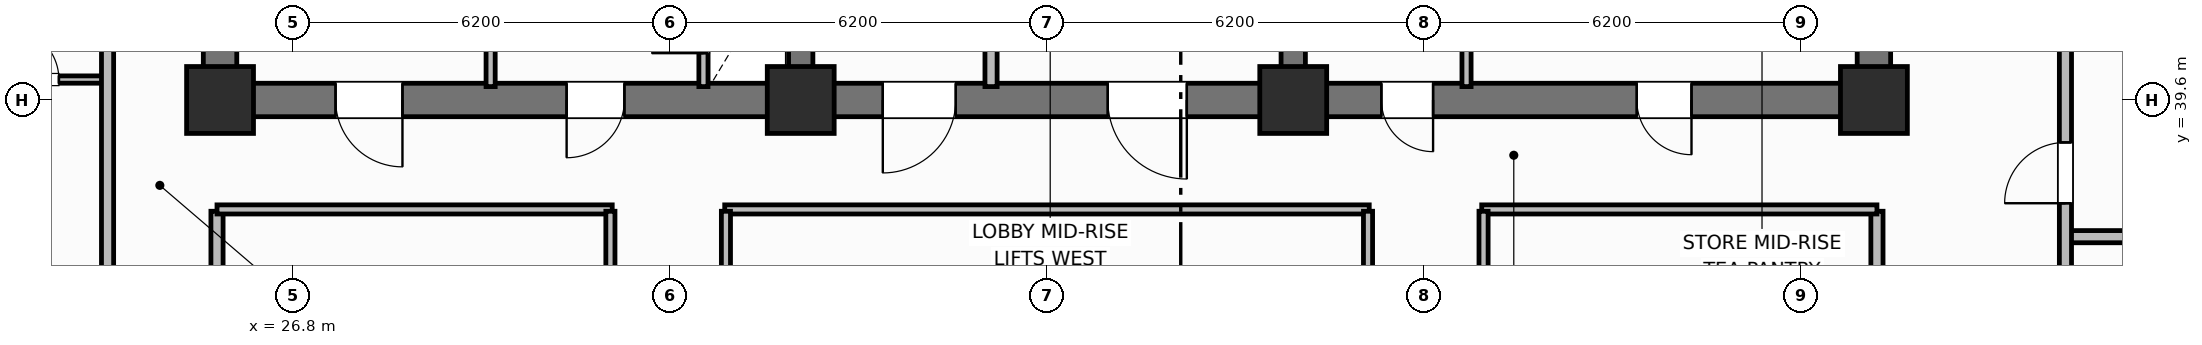
"""IFC4 building model, lengths in metres.
Left out: names, types, materials, properties, quantities, classifications, styles, units other than length and angle.
Written with IfcOpenShell. Run it as: python <this file> out.ifc"""

import sys

from ifc_helpers import new_model, si_unit, direction, frame, frame_2d, origin, origin_2d, place, context, subcontext, project, spatial, rectangle, extrude, element, fill, save


model = new_model("IFC4")
c1 = context("Model", 3, precision=1e-05, world=origin(), true_north=direction((0.0, 1.0)))
c2 = subcontext(c1, "Body", "Model", "MODEL_VIEW")
j1 = project(units=[si_unit("LENGTHUNIT", "METRE"), si_unit("PLANEANGLEUNIT", "RADIAN")], contexts=[c1])
p1 = place(None, origin())
s1 = spatial("IfcSite", under=j1, at=p1, CompositionType="ELEMENT")
p2 = place(p1, origin())
s2 = spatial("IfcBuilding", under=s1, at=p2, CompositionType="ELEMENT")
p3 = place(p2, frame((0.0, 0.0, 106.8)))
s3 = spatial("IfcBuildingStorey", under=s2, at=p3, CompositionType="ELEMENT", Elevation=106.8)
for number, where, z_axis, x_axis in (
    (1, (25.6, 39.875, 0.0), (0.0, 0.0, 1.0), (0.0, 1.0, 0.0)),
    (2, (52.8, 39.875, 0.0), (0.0, 0.0, 1.0), (0.0, 1.0, 0.0)),
):
    element("IfcWall", number, at=place(p3, frame(where, z_axis=z_axis, x_axis=x_axis)), inside=s3, PredefinedType="SHEAR", context=c2, shape_type="SweptSolid", body=[
        extrude(rectangle(XDim=5.65, YDim=0.55, at=frame_2d((2.825, 0.0))), origin(), (0.0, 0.0, 1.0), 3.7),
    ])
p4 = place(p3, frame((52.8, 39.6, 0.0), z_axis=(0.0, 0.0, 1.0), x_axis=(-1.0, 0.0, 0.0)))
e3 = element("IfcWall", 3, at=p4, inside=s3, PredefinedType="SHEAR", context=c2, shape_type="SweptSolid", body=[
    extrude(rectangle(XDim=27.2, YDim=0.55, at=frame_2d((13.6, 0.0))), origin(), (0.0, 0.0, 1.0), 3.7),
])
p5 = place(p4, frame((24.2, 0.0, 0.0)))
e4 = element("IfcOpeningElement", 4, at=p5, cuts=e3, PredefinedType="OPENING", context=c2, shape_type="SweptSolid", body=[
    extrude(rectangle(XDim=1.1, YDim=2.15, at=frame_2d((0.55, 1.075))), frame((0.0, 0.285, 0.0), z_axis=(0.0, -1.0, 0.0), x_axis=(1.0, 0.0, 0.0)), (0.0, 0.0, 1.0), 0.57),
])
p6 = place(p4, frame((20.55, 0.0, 0.0)))
e5 = element("IfcOpeningElement", 5, at=p6, cuts=e3, PredefinedType="OPENING", context=c2, shape_type="SweptSolid", body=[
    extrude(rectangle(XDim=0.95, YDim=2.1, at=frame_2d((0.475, 1.05))), frame((0.0, 0.285, 0.0), z_axis=(0.0, -1.0, 0.0), x_axis=(1.0, 0.0, 0.0)), (0.0, 0.0, 1.0), 0.57),
])
p7 = place(p4, frame((15.1, 0.0, 0.0)))
e6 = element("IfcOpeningElement", 6, at=p7, cuts=e3, PredefinedType="OPENING", context=c2, shape_type="SweptSolid", body=[
    extrude(rectangle(XDim=1.2, YDim=2.15, at=frame_2d((0.6, 1.075))), frame((0.0, 0.285, 0.0), z_axis=(0.0, -1.0, 0.0), x_axis=(1.0, 0.0, 0.0)), (0.0, 0.0, 1.0), 0.57),
])
p8 = place(p4, frame((11.3, 0.0, 0.0)))
e7 = element("IfcOpeningElement", 7, at=p8, cuts=e3, PredefinedType="OPENING", context=c2, shape_type="SweptSolid", body=[
    extrude(rectangle(XDim=1.3, YDim=2.2, at=frame_2d((0.65, 1.1))), frame((0.0, 0.285, 0.0), z_axis=(0.0, -1.0, 0.0), x_axis=(1.0, 0.0, 0.0)), (0.0, 0.0, 1.0), 0.57),
])
p9 = place(p4, frame((7.25, 0.0, 0.0)))
e8 = element("IfcOpeningElement", 8, at=p9, cuts=e3, PredefinedType="OPENING", context=c2, shape_type="SweptSolid", body=[
    extrude(rectangle(XDim=0.85, YDim=2.1, at=frame_2d((0.425, 1.05))), frame((0.0, 0.285, 0.0), z_axis=(0.0, -1.0, 0.0), x_axis=(1.0, 0.0, 0.0)), (0.0, 0.0, 1.0), 0.57),
])
p10 = place(p4, frame((3.0, 0.0, 0.0)))
e9 = element("IfcOpeningElement", 9, at=p10, cuts=e3, PredefinedType="OPENING", context=c2, shape_type="SweptSolid", body=[
    extrude(rectangle(XDim=0.9, YDim=2.1, at=frame_2d((0.45, 1.05))), frame((0.0, 0.285, 0.0), z_axis=(0.0, -1.0, 0.0), x_axis=(1.0, 0.0, 0.0)), (0.0, 0.0, 1.0), 0.57),
])
for number, where, z_axis, x_axis in (
    (10, (35.15, 39.875, 0.0), (0.0, 0.0, 1.0), (0.0, 1.0, 0.0)),
    (11, (43.25, 39.875, 0.0), (0.0, 0.0, 1.0), (0.0, 1.0, 0.0)),
):
    element("IfcWall", number, at=place(p3, frame(where, z_axis=z_axis, x_axis=x_axis)), inside=s3, PredefinedType="SHEAR", context=c2, shape_type="SweptSolid", body=[
        extrude(rectangle(XDim=5.65, YDim=0.4, at=frame_2d((2.825, 0.0))), origin(), (0.0, 0.0, 1.0), 3.7),
    ])
for number, where, z_axis, x_axis in (
    (12, (25.6, 39.6, 0.0), (0.0, 0.0, 1.0), (1.0, 0.0, 0.0)),
    (13, (35.15, 39.6, 0.0), (0.0, 0.0, 1.0), (1.0, 0.0, 0.0)),
    (14, (43.25, 39.6, 0.0), (0.0, 0.0, 1.0), (1.0, 0.0, 0.0)),
    (15, (52.8, 39.6, 0.0), (0.0, 0.0, 1.0), (1.0, 0.0, 0.0)),
):
    element("IfcColumn", number, at=place(p3, frame(where, z_axis=z_axis, x_axis=x_axis)), inside=s3, PredefinedType="COLUMN", context=c2, shape_type="SweptSolid", body=[
        extrude(rectangle(XDim=1.1, YDim=1.1, at=origin_2d()), origin(), (0.0, 0.0, 1.0), 3.7),
    ])
p11 = place(p3, frame((33.55, 39.82, 0.0), z_axis=(0.0, 0.0, 1.0), x_axis=(0.0, 1.0, 0.0)))
e16 = element("IfcWall", 16, at=p11, inside=s3, PredefinedType="PARTITIONING", context=c2, shape_type="SweptSolid", body=[
    extrude(rectangle(XDim=2.13, YDim=0.15, at=frame_2d((1.065, 0.0))), origin(), (0.0, 0.0, 1.0), 2.53),
])
p12 = place(p11, frame((0.55, 0.0, 0.0)))
e17 = element("IfcOpeningElement", 17, at=p12, cuts=e16, PredefinedType="OPENING", context=c2, shape_type="SweptSolid", body=[
    extrude(rectangle(XDim=0.85, YDim=2.05, at=frame_2d((0.425, 1.025))), frame((0.0, 0.085, 0.0), z_axis=(0.0, -1.0, 0.0), x_axis=(1.0, 0.0, 0.0)), (0.0, 0.0, 1.0), 0.17),
])
p13 = place(p3, frame((30.05, 39.82, 0.0), z_axis=(0.0, 0.0, 1.0), x_axis=(0.0, 1.0, 0.0)))
e18 = element("IfcWall", 18, at=p13, inside=s3, PredefinedType="PARTITIONING", context=c2, shape_type="SweptSolid", body=[
    extrude(rectangle(XDim=2.13, YDim=0.15, at=frame_2d((1.065, 0.0))), origin(), (0.0, 0.0, 1.0), 2.53),
])
p14 = place(p3, frame((38.28, 39.82, 0.0), z_axis=(0.0, 0.0, 1.0), x_axis=(0.0, 1.0, 0.0)))
e19 = element("IfcWall", 19, at=p14, inside=s3, PredefinedType="PARTITIONING", context=c2, shape_type="SweptSolid", body=[
    extrude(rectangle(XDim=2.73, YDim=0.2, at=frame_2d((1.365, 0.0))), origin(), (0.0, 0.0, 1.0), 2.53),
])
p15 = place(p3, frame((46.1, 39.82, 0.0), z_axis=(0.0, 0.0, 1.0), x_axis=(0.0, 1.0, 0.0)))
e20 = element("IfcWall", 20, at=p15, inside=s3, PredefinedType="PARTITIONING", context=c2, shape_type="SweptSolid", body=[
    extrude(rectangle(XDim=2.73, YDim=0.15, at=frame_2d((1.365, 0.0))), origin(), (0.0, 0.0, 1.0), 2.53),
])
for number, where, z_axis, x_axis in (
    (21, (25.55, 18.63, 0.0), (0.0, 0.0, 1.0), (0.0, 1.0, 0.0)),
    (22, (52.85, 18.63, 0.0), (0.0, 0.0, 1.0), (0.0, 1.0, 0.0)),
):
    element("IfcWall", number, at=place(p3, frame(where, z_axis=z_axis, x_axis=x_axis)), inside=s3, PredefinedType="PARTITIONING", context=c2, shape_type="SweptSolid", body=[
        extrude(rectangle(XDim=19.14, YDim=0.2, at=frame_2d((9.57, 0.0))), origin(), (0.0, 0.0, 1.0), 2.53),
    ])
p16 = place(p3, frame((25.55, 37.8, 0.0), z_axis=(0.0, 0.0, 1.0), x_axis=(1.0, 0.0, 0.0)))
e23 = element("IfcWall", 23, at=p16, inside=s3, PredefinedType="PARTITIONING", context=c2, shape_type="SweptSolid", body=[
    extrude(rectangle(XDim=6.5, YDim=0.15, at=frame_2d((3.25, 0.0))), origin(), (0.0, 0.0, 1.0), 2.53),
])
p17 = place(p3, frame((33.9, 37.8, 0.0), z_axis=(0.0, 0.0, 1.0), x_axis=(1.0, 0.0, 0.0)))
e24 = element("IfcWall", 24, at=p17, inside=s3, PredefinedType="PARTITIONING", context=c2, shape_type="SweptSolid", body=[
    extrude(rectangle(XDim=10.6, YDim=0.15, at=frame_2d((5.3, 0.0))), origin(), (0.0, 0.0, 1.0), 2.53),
])
p18 = place(p3, frame((46.35, 37.8, 0.0), z_axis=(0.0, 0.0, 1.0), x_axis=(1.0, 0.0, 0.0)))
e25 = element("IfcWall", 25, at=p18, inside=s3, PredefinedType="PARTITIONING", context=c2, shape_type="SweptSolid", body=[
    extrude(rectangle(XDim=6.5, YDim=0.15, at=frame_2d((3.25, 0.0))), origin(), (0.0, 0.0, 1.0), 2.53),
])
p19 = place(p3, frame((32.02, 18.63, 0.0), z_axis=(0.0, 0.0, 1.0), x_axis=(0.0, 1.0, 0.0)))
e26 = element("IfcWall", 26, at=p19, inside=s3, PredefinedType="PARTITIONING", context=c2, shape_type="SweptSolid", body=[
    extrude(rectangle(XDim=19.14, YDim=0.15, at=frame_2d((9.57, 0.0))), origin(), (0.0, 0.0, 1.0), 2.53),
])
p20 = place(p19, frame((5.5, 0.0, 0.0)))
e27 = element("IfcOpeningElement", 27, at=p20, cuts=e26, PredefinedType="OPENING", context=c2, shape_type="SweptSolid", body=[
    extrude(rectangle(XDim=1.0, YDim=2.15, at=frame_2d((0.5, 1.075))), frame((0.0, 0.085, 0.0), z_axis=(0.0, -1.0, 0.0), x_axis=(1.0, 0.0, 0.0)), (0.0, 0.0, 1.0), 0.17),
])
p21 = place(p3, frame((33.92, 18.63, 0.0), z_axis=(0.0, 0.0, 1.0), x_axis=(0.0, 1.0, 0.0)))
e28 = element("IfcWall", 28, at=p21, inside=s3, PredefinedType="PARTITIONING", context=c2, shape_type="SweptSolid", body=[
    extrude(rectangle(XDim=19.14, YDim=0.15, at=frame_2d((9.57, 0.0))), origin(), (0.0, 0.0, 1.0), 2.53),
])
p22 = place(p21, frame((2.4, 0.0, 0.0)))
e29 = element("IfcOpeningElement", 29, at=p22, cuts=e28, PredefinedType="OPENING", context=c2, shape_type="SweptSolid", body=[
    extrude(rectangle(XDim=1.0, YDim=2.15, at=frame_2d((0.5, 1.075))), frame((0.0, 0.085, 0.0), z_axis=(0.0, -1.0, 0.0), x_axis=(1.0, 0.0, 0.0)), (0.0, 0.0, 1.0), 0.17),
])
p23 = place(p3, frame((44.48, 18.63, 0.0), z_axis=(0.0, 0.0, 1.0), x_axis=(0.0, 1.0, 0.0)))
e30 = element("IfcWall", 30, at=p23, inside=s3, PredefinedType="PARTITIONING", context=c2, shape_type="SweptSolid", body=[
    extrude(rectangle(XDim=19.14, YDim=0.15, at=frame_2d((9.57, 0.0))), origin(), (0.0, 0.0, 1.0), 2.53),
])
p24 = place(p23, frame((10.804, 0.0, 0.0)))
e31 = element("IfcOpeningElement", 31, at=p24, cuts=e30, PredefinedType="OPENING", context=c2, shape_type="SweptSolid", body=[
    extrude(rectangle(XDim=1.0, YDim=2.15, at=frame_2d((0.5, 1.075))), frame((0.0, 0.085, 0.0), z_axis=(0.0, -1.0, 0.0), x_axis=(1.0, 0.0, 0.0)), (0.0, 0.0, 1.0), 0.17),
])
p25 = place(p3, frame((46.38, 18.63, 0.0), z_axis=(0.0, 0.0, 1.0), x_axis=(0.0, 1.0, 0.0)))
e32 = element("IfcWall", 32, at=p25, inside=s3, PredefinedType="PARTITIONING", context=c2, shape_type="SweptSolid", body=[
    extrude(rectangle(XDim=19.14, YDim=0.15, at=frame_2d((9.57, 0.0))), origin(), (0.0, 0.0, 1.0), 2.53),
])
p26 = place(p25, frame((5.5, 0.0, 0.0)))
e33 = element("IfcOpeningElement", 33, at=p26, cuts=e32, PredefinedType="OPENING", context=c2, shape_type="SweptSolid", body=[
    extrude(rectangle(XDim=1.0, YDim=2.15, at=frame_2d((0.5, 1.075))), frame((0.0, 0.085, 0.0), z_axis=(0.0, -1.0, 0.0), x_axis=(1.0, 0.0, 0.0)), (0.0, 0.0, 1.0), 0.17),
])
p27 = place(p3, frame((21.5, 39.936, 0.0), z_axis=(0.0, 0.0, 1.0), x_axis=(1.0, 0.0, 0.0)))
e34 = element("IfcWall", 34, at=p27, inside=s3, PredefinedType="PARTITIONING", context=c2, shape_type="SweptSolid", body=[
    extrude(rectangle(XDim=2.25, YDim=0.12, at=frame_2d((1.125, 0.0))), origin(), (0.0, 0.0, 1.0), 2.53),
])
p28 = place(p27, frame((0.6, 0.0, 0.0)))
e35 = element("IfcOpeningElement", 35, at=p28, cuts=e34, PredefinedType="OPENING", context=c2, shape_type="SweptSolid", body=[
    extrude(rectangle(XDim=0.85, YDim=2.1, at=frame_2d((0.425, 1.05))), frame((0.0, 0.07, 0.0), z_axis=(0.0, -1.0, 0.0), x_axis=(1.0, 0.0, 0.0)), (0.0, 0.0, 1.0), 0.14),
])
p29 = place(p3, frame((23.75, 10.6, 0.0), z_axis=(0.0, 0.0, 1.0), x_axis=(0.0, 1.0, 0.0)))
e36 = element("IfcWall", 36, at=p29, inside=s3, PredefinedType="PARTITIONING", context=c2, shape_type="SweptSolid", body=[
    extrude(rectangle(XDim=35.2, YDim=0.2, at=frame_2d((17.6, 0.0))), origin(), (0.0, 0.0, 1.0), 2.53),
])
p30 = place(p29, frame((2.65, 0.0, 0.0)))
e37 = element("IfcOpeningElement", 37, at=p30, cuts=e36, PredefinedType="OPENING", context=c2, shape_type="SweptSolid", body=[
    extrude(rectangle(XDim=1.0, YDim=2.15, at=frame_2d((0.5, 1.075))), frame((0.0, 0.11, 0.0), z_axis=(0.0, -1.0, 0.0), x_axis=(1.0, 0.0, 0.0)), (0.0, 0.0, 1.0), 0.22),
])
p31 = place(p29, frame((12.87, 0.0, 0.0)))
e38 = element("IfcOpeningElement", 38, at=p31, cuts=e36, PredefinedType="OPENING", context=c2, shape_type="SweptSolid", body=[
    extrude(rectangle(XDim=1.0, YDim=2.15, at=frame_2d((0.5, 1.075))), frame((0.0, 0.11, 0.0), z_axis=(0.0, -1.0, 0.0), x_axis=(1.0, 0.0, 0.0)), (0.0, 0.0, 1.0), 0.22),
])
p32 = place(p29, frame((24.486, 0.0, 0.0)))
e39 = element("IfcOpeningElement", 39, at=p32, cuts=e36, PredefinedType="OPENING", context=c2, shape_type="SweptSolid", body=[
    extrude(rectangle(XDim=1.0, YDim=2.15, at=frame_2d((0.5, 1.075))), frame((0.0, 0.11, 0.0), z_axis=(0.0, -1.0, 0.0), x_axis=(1.0, 0.0, 0.0)), (0.0, 0.0, 1.0), 0.22),
])
p33 = place(p3, frame((55.95, 37.352, 0.0), z_axis=(0.0, 0.0, 1.0), x_axis=(1.0, 0.0, 0.0)))
e40 = element("IfcWall", 40, at=p33, inside=s3, PredefinedType="PARTITIONING", context=c2, shape_type="SweptSolid", body=[
    extrude(rectangle(XDim=7.88, YDim=0.2, at=frame_2d((3.94, 0.0))), origin(), (0.0, 0.0, 1.0), 2.53),
])
p34 = place(p3, frame((55.95, 10.6, 0.0), z_axis=(0.0, 0.0, 1.0), x_axis=(0.0, 1.0, 0.0)))
e41 = element("IfcWall", 41, at=p34, inside=s3, PredefinedType="PARTITIONING", context=c2, shape_type="SweptSolid", body=[
    extrude(rectangle(XDim=35.2, YDim=0.2, at=frame_2d((17.6, 0.0))), origin(), (0.0, 0.0, 1.0), 2.53),
])
p35 = place(p34, frame((2.65, 0.0, 0.0)))
e42 = element("IfcOpeningElement", 42, at=p35, cuts=e41, PredefinedType="OPENING", context=c2, shape_type="SweptSolid", body=[
    extrude(rectangle(XDim=1.0, YDim=2.15, at=frame_2d((0.5, 1.075))), frame((0.0, 0.11, 0.0), z_axis=(0.0, -1.0, 0.0), x_axis=(1.0, 0.0, 0.0)), (0.0, 0.0, 1.0), 0.22),
])
p36 = place(p34, frame((11.352, 0.0, 0.0)))
e43 = element("IfcOpeningElement", 43, at=p36, cuts=e41, PredefinedType="OPENING", context=c2, shape_type="SweptSolid", body=[
    extrude(rectangle(XDim=1.0, YDim=2.15, at=frame_2d((0.5, 1.075))), frame((0.0, 0.11, 0.0), z_axis=(0.0, -1.0, 0.0), x_axis=(1.0, 0.0, 0.0)), (0.0, 0.0, 1.0), 0.22),
])
p37 = place(p34, frame((21.37, 0.0, 0.0)))
e44 = element("IfcOpeningElement", 44, at=p37, cuts=e41, PredefinedType="OPENING", context=c2, shape_type="SweptSolid", body=[
    extrude(rectangle(XDim=1.0, YDim=2.15, at=frame_2d((0.5, 1.075))), frame((0.0, 0.11, 0.0), z_axis=(0.0, -1.0, 0.0), x_axis=(1.0, 0.0, 0.0)), (0.0, 0.0, 1.0), 0.22),
])
p38 = place(p34, frame((27.302, 0.0, 0.0)))
e45 = element("IfcOpeningElement", 45, at=p38, cuts=e41, PredefinedType="OPENING", context=c2, shape_type="SweptSolid", body=[
    extrude(rectangle(XDim=1.0, YDim=2.15, at=frame_2d((0.5, 1.075))), frame((0.0, 0.11, 0.0), z_axis=(0.0, -1.0, 0.0), x_axis=(1.0, 0.0, 0.0)), (0.0, 0.0, 1.0), 0.22),
])
p39 = place(p12, origin())
e46 = element("IfcDoor", 46, at=p39, inside=s3, OperationType="SINGLE_SWING_LEFT", PredefinedType="TRAPDOOR", context=c2, shape_type="SweptSolid", body=[
    extrude(rectangle(XDim=0.85, YDim=2.05, at=frame_2d((0.425, 1.025))), frame((0.0, 0.025, 0.0), z_axis=(0.0, -1.0, 0.0), x_axis=(1.0, 0.0, 0.0)), (0.0, 0.0, 1.0), 0.05),
])
fill(e17, e46)
p40 = place(p28, origin())
e47 = element("IfcDoor", 47, at=p40, inside=s3, OperationType="SINGLE_SWING_LEFT", PredefinedType="DOOR", context=c2, shape_type="SweptSolid", body=[
    extrude(rectangle(XDim=0.85, YDim=2.1, at=frame_2d((0.425, 1.05))), frame((0.0, 0.025, 0.0), z_axis=(0.0, -1.0, 0.0), x_axis=(1.0, 0.0, 0.0)), (0.0, 0.0, 1.0), 0.05),
])
fill(e35, e47)
p41 = place(p38, origin())
e48 = element("IfcDoor", 48, at=p41, inside=s3, OperationType="SINGLE_SWING_LEFT", PredefinedType="DOOR", context=c2, shape_type="SweptSolid", body=[
    extrude(rectangle(XDim=1.0, YDim=2.15, at=frame_2d((0.5, 1.075))), frame((0.0, 0.025, 0.0), z_axis=(0.0, -1.0, 0.0), x_axis=(1.0, 0.0, 0.0)), (0.0, 0.0, 1.0), 0.05),
])
fill(e45, e48)
p42 = place(p5, origin())
e49 = element("IfcDoor", 49, at=p42, inside=s3, OperationType="SINGLE_SWING_LEFT", PredefinedType="DOOR", context=c2, shape_type="SweptSolid", body=[
    extrude(rectangle(XDim=1.1, YDim=2.15, at=frame_2d((0.55, 1.075))), frame((0.0, 0.025, 0.0), z_axis=(0.0, -1.0, 0.0), x_axis=(1.0, 0.0, 0.0)), (0.0, 0.0, 1.0), 0.05),
])
fill(e4, e49)
p43 = place(p6, origin())
e50 = element("IfcDoor", 50, at=p43, inside=s3, OperationType="SINGLE_SWING_RIGHT", PredefinedType="DOOR", context=c2, shape_type="SweptSolid", body=[
    extrude(rectangle(XDim=0.95, YDim=2.1, at=frame_2d((0.475, 1.05))), frame((0.0, 0.025, 0.0), z_axis=(0.0, -1.0, 0.0), x_axis=(1.0, 0.0, 0.0)), (0.0, 0.0, 1.0), 0.05),
])
fill(e5, e50)
p44 = place(p7, origin())
e51 = element("IfcDoor", 51, at=p44, inside=s3, OperationType="SINGLE_SWING_RIGHT", PredefinedType="DOOR", context=c2, shape_type="SweptSolid", body=[
    extrude(rectangle(XDim=1.2, YDim=2.15, at=frame_2d((0.6, 1.075))), frame((0.0, 0.025, 0.0), z_axis=(0.0, -1.0, 0.0), x_axis=(1.0, 0.0, 0.0)), (0.0, 0.0, 1.0), 0.05),
])
fill(e6, e51)
p45 = place(p8, origin())
e52 = element("IfcDoor", 52, at=p45, inside=s3, OperationType="SINGLE_SWING_LEFT", PredefinedType="DOOR", context=c2, shape_type="SweptSolid", body=[
    extrude(rectangle(XDim=1.3, YDim=2.2, at=frame_2d((0.65, 1.1))), frame((0.0, 0.025, 0.0), z_axis=(0.0, -1.0, 0.0), x_axis=(1.0, 0.0, 0.0)), (0.0, 0.0, 1.0), 0.05),
])
fill(e7, e52)
p46 = place(p9, origin())
e53 = element("IfcDoor", 53, at=p46, inside=s3, OperationType="SINGLE_SWING_LEFT", PredefinedType="DOOR", context=c2, shape_type="SweptSolid", body=[
    extrude(rectangle(XDim=0.85, YDim=2.1, at=frame_2d((0.425, 1.05))), frame((0.0, 0.025, 0.0), z_axis=(0.0, -1.0, 0.0), x_axis=(1.0, 0.0, 0.0)), (0.0, 0.0, 1.0), 0.05),
])
fill(e8, e53)
p47 = place(p10, origin())
e54 = element("IfcDoor", 54, at=p47, inside=s3, OperationType="SINGLE_SWING_LEFT", PredefinedType="DOOR", context=c2, shape_type="SweptSolid", body=[
    extrude(rectangle(XDim=0.9, YDim=2.1, at=frame_2d((0.45, 1.05))), frame((0.0, 0.025, 0.0), z_axis=(0.0, -1.0, 0.0), x_axis=(1.0, 0.0, 0.0)), (0.0, 0.0, 1.0), 0.05),
])
fill(e9, e54)
save(model, sys.argv[1])
